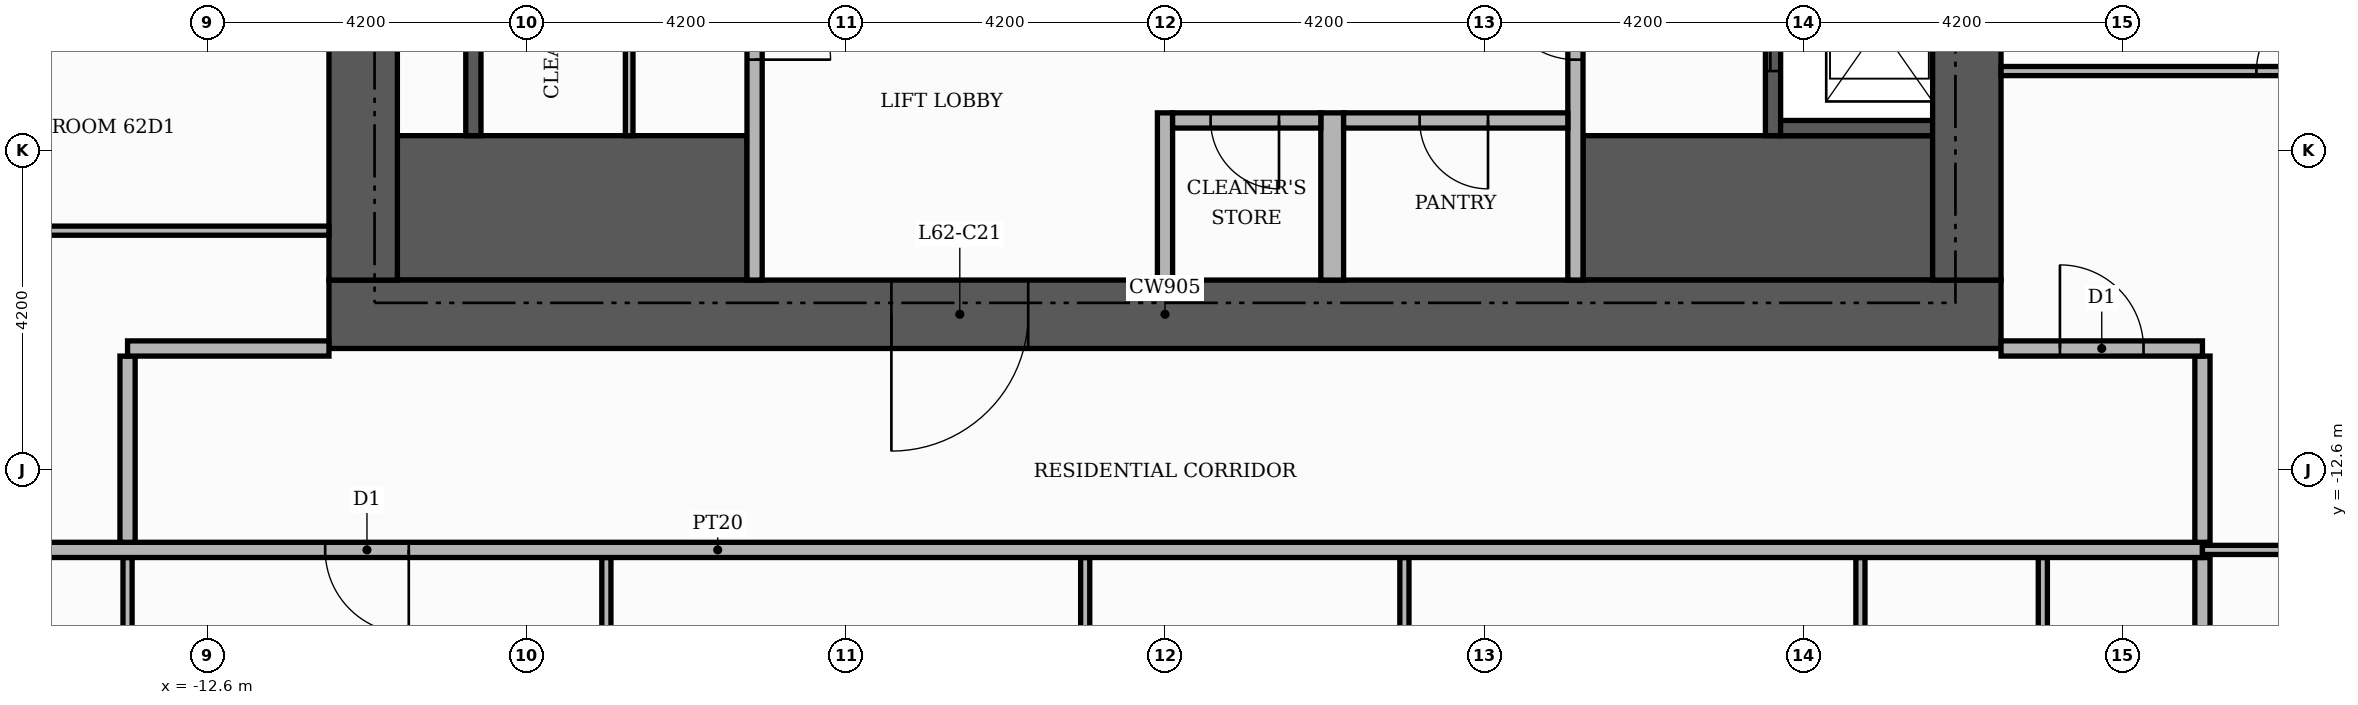
"""IFC4 building model, lengths in metres.
Left out: names, types, materials, properties, quantities, classifications, styles, units other than length and angle.
Written with IfcOpenShell. Run it as: python <this file> out.ifc"""

import sys

from ifc_helpers import new_model, si_unit, direction, frame, frame_2d, origin, place, context, subcontext, project, spatial, rectangle, extrude, element, fill, save


model = new_model("IFC4")
c1 = context("Model", 3, precision=1e-05, world=origin(), true_north=direction((0.0, 1.0)))
c2 = subcontext(c1, "Body", "Model", "MODEL_VIEW")
j1 = project(units=[si_unit("LENGTHUNIT", "METRE"), si_unit("PLANEANGLEUNIT", "RADIAN")], contexts=[c1])
p1 = place(None, origin())
s1 = spatial("IfcSite", under=j1, at=p1, CompositionType="ELEMENT")
p2 = place(p1, origin())
s2 = spatial("IfcBuilding", under=s1, at=p2, CompositionType="ELEMENT")
p3 = place(p2, frame((0.0, 0.0, 260.1)))
s3 = spatial("IfcBuildingStorey", under=s2, at=p3, CompositionType="ELEMENT", Elevation=260.1)
for number, where, z_axis, x_axis in (
    (1, (-10.1, -9.15, 0.0), (0.0, 0.0, 1.0), (1.0, 0.0, 0.0)),
    (2, (5.5, -9.15, 0.0), (0.0, 0.0, 1.0), (1.0, 0.0, 0.0)),
):
    element("IfcWall", number, at=place(p3, frame(where, z_axis=z_axis, x_axis=x_axis)), inside=s3, PredefinedType="SHEAR", context=c2, shape_type="SweptSolid", body=[
        extrude(rectangle(XDim=4.6, YDim=1.9, at=frame_2d((2.3, 0.0))), origin(), (0.0, 0.0, 1.0), 3.48),
    ])
p4 = place(p3, frame((-9.1, -8.2, 0.0), z_axis=(0.0, 0.0, 1.0), x_axis=(0.0, 1.0, 0.0)))
e3 = element("IfcWall", 3, at=p4, inside=s3, PredefinedType="SHEAR", context=c2, shape_type="SweptSolid", body=[
    extrude(rectangle(XDim=16.4, YDim=0.2, at=frame_2d((8.2, 0.0))), origin(), (0.0, 0.0, 1.0), 3.48),
])
p5 = place(p3, frame((8.0, -8.2, 0.0), z_axis=(0.0, 0.0, 1.0), x_axis=(0.0, 1.0, 0.0)))
e4 = element("IfcWall", 4, at=p5, inside=s3, PredefinedType="SHEAR", context=c2, shape_type="SweptSolid", body=[
    extrude(rectangle(XDim=16.4, YDim=0.2, at=frame_2d((8.2, 0.0))), origin(), (0.0, 0.0, 1.0), 3.48),
])
p6 = place(p5, frame((0.85, 0.0, 0.0)))
e5 = element("IfcOpeningElement", 5, at=p6, cuts=e4, PredefinedType="OPENING", context=c2, shape_type="SweptSolid", body=[
    extrude(rectangle(XDim=1.2, YDim=2.1, at=frame_2d((0.6, 1.05))), frame((0.0, 0.11, 0.0), z_axis=(0.0, -1.0, 0.0), x_axis=(1.0, 0.0, 0.0)), (0.0, 0.0, 1.0), 0.22),
])
p7 = place(p5, frame((3.55, 0.0, 0.0)))
e6 = element("IfcOpeningElement", 6, at=p7, cuts=e4, PredefinedType="OPENING", context=c2, shape_type="SweptSolid", body=[
    extrude(rectangle(XDim=1.2, YDim=2.1, at=frame_2d((0.6, 1.05))), frame((0.0, 0.11, 0.0), z_axis=(0.0, -1.0, 0.0), x_axis=(1.0, 0.0, 0.0)), (0.0, 0.0, 1.0), 0.22),
])
p8 = place(p5, frame((6.25, 0.0, 0.0)))
e7 = element("IfcOpeningElement", 7, at=p8, cuts=e4, PredefinedType="OPENING", context=c2, shape_type="SweptSolid", body=[
    extrude(rectangle(XDim=1.2, YDim=2.1, at=frame_2d((0.6, 1.05))), frame((0.0, 0.11, 0.0), z_axis=(0.0, -1.0, 0.0), x_axis=(1.0, 0.0, 0.0)), (0.0, 0.0, 1.0), 0.22),
])
p9 = place(p5, frame((8.95, 0.0, 0.0)))
e8 = element("IfcOpeningElement", 8, at=p9, cuts=e4, PredefinedType="OPENING", context=c2, shape_type="SweptSolid", body=[
    extrude(rectangle(XDim=1.2, YDim=2.1, at=frame_2d((0.6, 1.05))), frame((0.0, 0.11, 0.0), z_axis=(0.0, -1.0, 0.0), x_axis=(1.0, 0.0, 0.0)), (0.0, 0.0, 1.0), 0.22),
])
p10 = place(p5, frame((11.65, 0.0, 0.0)))
e9 = element("IfcOpeningElement", 9, at=p10, cuts=e4, PredefinedType="OPENING", context=c2, shape_type="SweptSolid", body=[
    extrude(rectangle(XDim=1.2, YDim=2.1, at=frame_2d((0.6, 1.05))), frame((0.0, 0.11, 0.0), z_axis=(0.0, -1.0, 0.0), x_axis=(1.0, 0.0, 0.0)), (0.0, 0.0, 1.0), 0.22),
])
p11 = place(p5, frame((14.35, 0.0, 0.0)))
e10 = element("IfcOpeningElement", 10, at=p11, cuts=e4, PredefinedType="OPENING", context=c2, shape_type="SweptSolid", body=[
    extrude(rectangle(XDim=1.2, YDim=2.1, at=frame_2d((0.6, 1.05))), frame((0.0, 0.11, 0.0), z_axis=(0.0, -1.0, 0.0), x_axis=(1.0, 0.0, 0.0)), (0.0, 0.0, 1.0), 0.22),
])
p12 = place(p3, frame((8.1, -8.1, 0.0), z_axis=(0.0, 0.0, 1.0), x_axis=(1.0, 0.0, 0.0)))
e11 = element("IfcWall", 11, at=p12, inside=s3, PredefinedType="SHEAR", context=c2, shape_type="SweptSolid", body=[
    extrude(rectangle(XDim=2.0, YDim=0.2, at=frame_2d((1.0, 0.0))), origin(), (0.0, 0.0, 1.0), 3.48),
])
p13 = place(p3, frame((-11.0, -10.55, 0.0), z_axis=(0.0, 0.0, 1.0), x_axis=(1.0, 0.0, 0.0)))
e12 = element("IfcWall", 12, at=p13, inside=s3, PredefinedType="SHEAR", context=c2, shape_type="SweptSolid", body=[
    extrude(rectangle(XDim=22.0, YDim=0.9, at=frame_2d((11.0, 0.0))), origin(), (0.0, 0.0, 1.0), 3.48),
])
p14 = place(p13, frame((7.4, 0.0, 0.0)))
e13 = element("IfcOpeningElement", 13, at=p14, cuts=e12, PredefinedType="OPENING", context=c2, shape_type="SweptSolid", body=[
    extrude(rectangle(XDim=1.8, YDim=2.2, at=frame_2d((0.9, 1.1))), frame((0.0, 0.46, 0.0), z_axis=(0.0, -1.0, 0.0), x_axis=(1.0, 0.0, 0.0)), (0.0, 0.0, 1.0), 0.92),
])
for number, where, z_axis, x_axis in (
    (14, (-10.55, -10.1, 0.0), (0.0, 0.0, 1.0), (0.0, 1.0, 0.0)),
    (15, (10.55, -10.1, 0.0), (0.0, 0.0, 1.0), (0.0, 1.0, 0.0)),
):
    element("IfcWall", number, at=place(p3, frame(where, z_axis=z_axis, x_axis=x_axis)), inside=s3, PredefinedType="SHEAR", context=c2, shape_type="SweptSolid", body=[
        extrude(rectangle(XDim=20.2, YDim=0.9, at=frame_2d((10.1, 0.0))), origin(), (0.0, 0.0, 1.0), 3.48),
    ])
p15 = place(p3, frame((-5.4, -10.1, 0.0), z_axis=(0.0, 0.0, 1.0), x_axis=(0.0, 1.0, 0.0)))
e16 = element("IfcWall", 16, at=p15, inside=s3, PredefinedType="PARTITIONING", context=c2, shape_type="SweptSolid", body=[
    extrude(rectangle(XDim=4.6, YDim=0.2, at=frame_2d((2.3, 0.0))), origin(), (0.0, 0.0, 1.0), 3.48),
])
p16 = place(p15, frame((2.9, 0.0, 0.0)))
e17 = element("IfcOpeningElement", 17, at=p16, cuts=e16, PredefinedType="OPENING", context=c2, shape_type="SweptSolid", body=[
    extrude(rectangle(XDim=1.0, YDim=2.1, at=frame_2d((0.5, 1.05))), frame((0.0, 0.11, 0.0), z_axis=(0.0, -1.0, 0.0), x_axis=(1.0, 0.0, 0.0)), (0.0, 0.0, 1.0), 0.22),
])
p17 = place(p3, frame((0.0, -10.1, 0.0), z_axis=(0.0, 0.0, 1.0), x_axis=(0.0, 1.0, 0.0)))
e18 = element("IfcWall", 18, at=p17, inside=s3, PredefinedType="PARTITIONING", context=c2, shape_type="SweptSolid", body=[
    extrude(rectangle(XDim=2.2, YDim=0.2, at=frame_2d((1.1, 0.0))), origin(), (0.0, 0.0, 1.0), 3.48),
])
p18 = place(p3, frame((2.2, -10.1, 0.0), z_axis=(0.0, 0.0, 1.0), x_axis=(0.0, 1.0, 0.0)))
e19 = element("IfcWall", 19, at=p18, inside=s3, PredefinedType="PARTITIONING", context=c2, shape_type="SweptSolid", body=[
    extrude(rectangle(XDim=2.2, YDim=0.3, at=frame_2d((1.1, 0.0))), origin(), (0.0, 0.0, 1.0), 3.48),
])
p19 = place(p3, frame((5.4, -10.1, 0.0), z_axis=(0.0, 0.0, 1.0), x_axis=(0.0, 1.0, 0.0)))
e20 = element("IfcWall", 20, at=p19, inside=s3, PredefinedType="PARTITIONING", context=c2, shape_type="SweptSolid", body=[
    extrude(rectangle(XDim=4.6, YDim=0.2, at=frame_2d((2.3, 0.0))), origin(), (0.0, 0.0, 1.0), 3.48),
])
p20 = place(p19, frame((2.9, 0.0, 0.0)))
e21 = element("IfcOpeningElement", 21, at=p20, cuts=e20, PredefinedType="OPENING", context=c2, shape_type="SweptSolid", body=[
    extrude(rectangle(XDim=1.0, YDim=2.1, at=frame_2d((0.5, 1.05))), frame((0.0, 0.11, 0.0), z_axis=(0.0, -1.0, 0.0), x_axis=(1.0, 0.0, 0.0)), (0.0, 0.0, 1.0), 0.22),
])
p21 = place(p3, frame((-7.05, -8.2, 0.0), z_axis=(0.0, 0.0, 1.0), x_axis=(0.0, 1.0, 0.0)))
e22 = element("IfcWall", 22, at=p21, inside=s3, PredefinedType="PARTITIONING", context=c2, shape_type="SweptSolid", body=[
    extrude(rectangle(XDim=16.4, YDim=0.1, at=frame_2d((8.2, 0.0))), origin(), (0.0, 0.0, 1.0), 3.48),
])
p22 = place(p21, frame((1.35, 0.0, 0.0)))
e23 = element("IfcOpeningElement", 23, at=p22, cuts=e22, PredefinedType="OPENING", context=c2, shape_type="SweptSolid", body=[
    extrude(rectangle(XDim=0.9, YDim=2.1, at=frame_2d((0.45, 1.05))), frame((0.0, 0.06, 0.0), z_axis=(0.0, -1.0, 0.0), x_axis=(1.0, 0.0, 0.0)), (0.0, 0.0, 1.0), 0.12),
])
p23 = place(p21, frame((5.05, 0.0, 0.0)))
e24 = element("IfcOpeningElement", 24, at=p23, cuts=e22, PredefinedType="OPENING", context=c2, shape_type="SweptSolid", body=[
    extrude(rectangle(XDim=0.9, YDim=2.1, at=frame_2d((0.45, 1.05))), frame((0.0, 0.06, 0.0), z_axis=(0.0, -1.0, 0.0), x_axis=(1.0, 0.0, 0.0)), (0.0, 0.0, 1.0), 0.12),
])
p24 = place(p21, frame((8.95, 0.0, 0.0)))
e25 = element("IfcOpeningElement", 25, at=p24, cuts=e22, PredefinedType="OPENING", context=c2, shape_type="SweptSolid", body=[
    extrude(rectangle(XDim=0.9, YDim=2.1, at=frame_2d((0.45, 1.05))), frame((0.0, 0.06, 0.0), z_axis=(0.0, -1.0, 0.0), x_axis=(1.0, 0.0, 0.0)), (0.0, 0.0, 1.0), 0.12),
])
p25 = place(p21, frame((13.45, 0.0, 0.0)))
e26 = element("IfcOpeningElement", 26, at=p25, cuts=e22, PredefinedType="OPENING", context=c2, shape_type="SweptSolid", body=[
    extrude(rectangle(XDim=0.9, YDim=2.1, at=frame_2d((0.45, 1.05))), frame((0.0, 0.06, 0.0), z_axis=(0.0, -1.0, 0.0), x_axis=(1.0, 0.0, 0.0)), (0.0, 0.0, 1.0), 0.12),
])
p26 = place(p3, frame((0.1, -8.0, 0.0), z_axis=(0.0, 0.0, 1.0), x_axis=(1.0, 0.0, 0.0)))
e27 = element("IfcWall", 27, at=p26, inside=s3, PredefinedType="PARTITIONING", context=c2, shape_type="SweptSolid", body=[
    extrude(rectangle(XDim=1.95, YDim=0.2, at=frame_2d((0.975, 0.0))), origin(), (0.0, 0.0, 1.0), 3.48),
])
p27 = place(p26, frame((0.5, 0.0, 0.0)))
e28 = element("IfcOpeningElement", 28, at=p27, cuts=e27, PredefinedType="OPENING", context=c2, shape_type="SweptSolid", body=[
    extrude(rectangle(XDim=0.9, YDim=2.1, at=frame_2d((0.45, 1.05))), frame((0.0, 0.11, 0.0), z_axis=(0.0, -1.0, 0.0), x_axis=(1.0, 0.0, 0.0)), (0.0, 0.0, 1.0), 0.22),
])
p28 = place(p3, frame((2.35, -8.0, 0.0), z_axis=(0.0, 0.0, 1.0), x_axis=(1.0, 0.0, 0.0)))
e29 = element("IfcWall", 29, at=p28, inside=s3, PredefinedType="PARTITIONING", context=c2, shape_type="SweptSolid", body=[
    extrude(rectangle(XDim=2.95, YDim=0.2, at=frame_2d((1.475, 0.0))), origin(), (0.0, 0.0, 1.0), 3.48),
])
p29 = place(p28, frame((1.0, 0.0, 0.0)))
e30 = element("IfcOpeningElement", 30, at=p29, cuts=e29, PredefinedType="OPENING", context=c2, shape_type="SweptSolid", body=[
    extrude(rectangle(XDim=0.9, YDim=2.1, at=frame_2d((0.45, 1.05))), frame((0.0, 0.11, 0.0), z_axis=(0.0, -1.0, 0.0), x_axis=(1.0, 0.0, 0.0)), (0.0, 0.0, 1.0), 0.22),
])
p30 = place(p3, frame((13.65, -25.42, 0.0), z_axis=(0.0, 0.0, 1.0), x_axis=(0.0, 1.0, 0.0)))
e31 = element("IfcWall", 31, at=p30, inside=s3, PredefinedType="PARTITIONING", context=c2, shape_type="SweptSolid", body=[
    extrude(rectangle(XDim=11.67, YDim=0.2, at=frame_2d((5.835, 0.0))), origin(), (0.0, 0.0, 1.0), 3.48),
])
p31 = place(p3, frame((-13.65, -20.66, 0.0), z_axis=(0.0, 0.0, 1.0), x_axis=(0.0, 1.0, 0.0)))
e32 = element("IfcWall", 32, at=p31, inside=s3, PredefinedType="PARTITIONING", context=c2, shape_type="SweptSolid", body=[
    extrude(rectangle(XDim=6.91, YDim=0.12, at=frame_2d((3.455, 0.0))), origin(), (0.0, 0.0, 1.0), 3.48),
])
p32 = place(p31, frame((3.025, 0.0, 0.0)))
e33 = element("IfcOpeningElement", 33, at=p32, cuts=e32, PredefinedType="OPENING", context=c2, shape_type="SweptSolid", body=[
    extrude(rectangle(XDim=0.9, YDim=2.1, at=frame_2d((0.45, 1.05))), frame((0.0, 0.07, 0.0), z_axis=(0.0, -1.0, 0.0), x_axis=(1.0, 0.0, 0.0)), (0.0, 0.0, 1.0), 0.14),
])
for number, where, z_axis, x_axis in (
    (34, (-7.35, -19.16, 0.0), (0.0, 0.0, 1.0), (0.0, 1.0, 0.0)),
    (35, (-1.05, -19.16, 0.0), (0.0, 0.0, 1.0), (0.0, 1.0, 0.0)),
    (36, (3.15, -19.16, 0.0), (0.0, 0.0, 1.0), (0.0, 1.0, 0.0)),
    (37, (9.15, -19.16, 0.0), (0.0, 0.0, 1.0), (0.0, 1.0, 0.0)),
    (38, (11.55, -19.16, 0.0), (0.0, 0.0, 1.0), (0.0, 1.0, 0.0)),
):
    element("IfcWall", number, at=place(p3, frame(where, z_axis=z_axis, x_axis=x_axis)), inside=s3, PredefinedType="PARTITIONING", context=c2, shape_type="SweptSolid", body=[
        extrude(rectangle(XDim=5.41, YDim=0.12, at=frame_2d((2.705, 0.0))), origin(), (0.0, 0.0, 1.0), 3.48),
    ])
p33 = place(p3, frame((-25.42, -13.65, 0.0), z_axis=(0.0, 0.0, 1.0), x_axis=(1.0, 0.0, 0.0)))
e39 = element("IfcWall", 39, at=p33, inside=s3, PredefinedType="PARTITIONING", context=c2, shape_type="SweptSolid", body=[
    extrude(rectangle(XDim=39.07, YDim=0.2, at=frame_2d((19.535, 0.0))), origin(), (0.0, 0.0, 1.0), 3.48),
])
p34 = place(p33, frame((14.37, 0.0, 0.0)))
e40 = element("IfcOpeningElement", 40, at=p34, cuts=e39, PredefinedType="OPENING", context=c2, shape_type="SweptSolid", body=[
    extrude(rectangle(XDim=1.1, YDim=2.4, at=frame_2d((0.55, 1.2))), frame((0.0, 0.11, 0.0), z_axis=(0.0, -1.0, 0.0), x_axis=(1.0, 0.0, 0.0)), (0.0, 0.0, 1.0), 0.22),
])
p35 = place(p3, frame((13.65, -13.65, 0.0), z_axis=(0.0, 0.0, 1.0), x_axis=(1.0, 0.0, 0.0)))
e41 = element("IfcWall", 41, at=p35, inside=s3, PredefinedType="PARTITIONING", context=c2, shape_type="SweptSolid", body=[
    extrude(rectangle(XDim=6.47, YDim=0.12, at=frame_2d((3.235, 0.0))), origin(), (0.0, 0.0, 1.0), 3.48),
])
p36 = place(p35, frame((2.785, 0.0, 0.0)))
e42 = element("IfcOpeningElement", 42, at=p36, cuts=e41, PredefinedType="OPENING", context=c2, shape_type="SweptSolid", body=[
    extrude(rectangle(XDim=0.9, YDim=2.1, at=frame_2d((0.45, 1.05))), frame((0.0, 0.07, 0.0), z_axis=(0.0, -1.0, 0.0), x_axis=(1.0, 0.0, 0.0)), (0.0, 0.0, 1.0), 0.14),
])
for number, where, z_axis, x_axis in (
    (43, (-13.65, -13.55, 0.0), (0.0, 0.0, 1.0), (0.0, 1.0, 0.0)),
    (44, (13.65, -13.55, 0.0), (0.0, 0.0, 1.0), (0.0, 1.0, 0.0)),
):
    element("IfcWall", number, at=place(p3, frame(where, z_axis=z_axis, x_axis=x_axis)), inside=s3, PredefinedType="PARTITIONING", context=c2, shape_type="SweptSolid", body=[
        extrude(rectangle(XDim=2.45, YDim=0.2, at=frame_2d((1.225, 0.0))), origin(), (0.0, 0.0, 1.0), 3.48),
    ])
p37 = place(p3, frame((-13.65, -11.0, 0.0), z_axis=(0.0, 0.0, 1.0), x_axis=(1.0, 0.0, 0.0)))
e45 = element("IfcWall", 45, at=p37, inside=s3, PredefinedType="PARTITIONING", context=c2, shape_type="SweptSolid", body=[
    extrude(rectangle(XDim=2.65, YDim=0.2, at=frame_2d((1.325, 0.0))), origin(), (0.0, 0.0, 1.0), 3.48),
])
p38 = place(p3, frame((11.0, -11.0, 0.0), z_axis=(0.0, 0.0, 1.0), x_axis=(1.0, 0.0, 0.0)))
e46 = element("IfcWall", 46, at=p38, inside=s3, PredefinedType="PARTITIONING", context=c2, shape_type="SweptSolid", body=[
    extrude(rectangle(XDim=2.65, YDim=0.2, at=frame_2d((1.325, 0.0))), origin(), (0.0, 0.0, 1.0), 3.48),
])
p39 = place(p38, frame((0.775, 0.0, 0.0)))
e47 = element("IfcOpeningElement", 47, at=p39, cuts=e46, PredefinedType="OPENING", context=c2, shape_type="SweptSolid", body=[
    extrude(rectangle(XDim=1.1, YDim=2.4, at=frame_2d((0.55, 1.2))), frame((0.0, 0.11, 0.0), z_axis=(0.0, -1.0, 0.0), x_axis=(1.0, 0.0, 0.0)), (0.0, 0.0, 1.0), 0.22),
])
p40 = place(p3, frame((-19.22, -9.45, 0.0), z_axis=(0.0, 0.0, 1.0), x_axis=(1.0, 0.0, 0.0)))
e48 = element("IfcWall", 48, at=p40, inside=s3, PredefinedType="PARTITIONING", context=c2, shape_type="SweptSolid", body=[
    extrude(rectangle(XDim=8.22, YDim=0.12, at=frame_2d((4.11, 0.0))), origin(), (0.0, 0.0, 1.0), 3.48),
])
p41 = place(p3, frame((11.0, -7.35, 0.0), z_axis=(0.0, 0.0, 1.0), x_axis=(1.0, 0.0, 0.0)))
e49 = element("IfcWall", 49, at=p41, inside=s3, PredefinedType="PARTITIONING", context=c2, shape_type="SweptSolid", body=[
    extrude(rectangle(XDim=7.62, YDim=0.12, at=frame_2d((3.81, 0.0))), origin(), (0.0, 0.0, 1.0), 3.48),
])
p42 = place(p41, frame((3.36, 0.0, 0.0)))
e50 = element("IfcOpeningElement", 50, at=p42, cuts=e49, PredefinedType="OPENING", context=c2, shape_type="SweptSolid", body=[
    extrude(rectangle(XDim=0.9, YDim=2.1, at=frame_2d((0.45, 1.05))), frame((0.0, 0.07, 0.0), z_axis=(0.0, -1.0, 0.0), x_axis=(1.0, 0.0, 0.0)), (0.0, 0.0, 1.0), 0.14),
])
p43 = place(p6, origin())
e51 = element("IfcDoor", 51, at=p43, inside=s3, OperationType="SLIDING_TO_LEFT", PredefinedType="DOOR", context=c2, shape_type="SweptSolid", body=[
    extrude(rectangle(XDim=1.2, YDim=2.1, at=frame_2d((0.6, 1.05))), frame((0.0, 0.025, 0.0), z_axis=(0.0, -1.0, 0.0), x_axis=(1.0, 0.0, 0.0)), (0.0, 0.0, 1.0), 0.05),
])
fill(e5, e51)
p44 = place(p16, frame((1.0, 0.0, 0.0), z_axis=(0.0, 0.0, 1.0), x_axis=(-1.0, 0.0, 0.0)))
e52 = element("IfcDoor", 52, at=p44, inside=s3, OperationType="SINGLE_SWING_LEFT", PredefinedType="DOOR", context=c2, shape_type="SweptSolid", body=[
    extrude(rectangle(XDim=1.0, YDim=2.1, at=frame_2d((0.5, 1.05))), frame((0.0, 0.025, 0.0), z_axis=(0.0, -1.0, 0.0), x_axis=(1.0, 0.0, 0.0)), (0.0, 0.0, 1.0), 0.05),
])
fill(e17, e52)
p45 = place(p20, origin())
e53 = element("IfcDoor", 53, at=p45, inside=s3, OperationType="SINGLE_SWING_RIGHT", PredefinedType="DOOR", context=c2, shape_type="SweptSolid", body=[
    extrude(rectangle(XDim=1.0, YDim=2.1, at=frame_2d((0.5, 1.05))), frame((0.0, 0.025, 0.0), z_axis=(0.0, -1.0, 0.0), x_axis=(1.0, 0.0, 0.0)), (0.0, 0.0, 1.0), 0.05),
])
fill(e21, e53)
p46 = place(p14, frame((1.8, 0.0, 0.0), z_axis=(0.0, 0.0, 1.0), x_axis=(-1.0, 0.0, 0.0)))
e54 = element("IfcDoor", 54, at=p46, inside=s3, OperationType="DOUBLE_DOOR_SINGLE_SWING", PredefinedType="DOOR", context=c2, shape_type="SweptSolid", body=[
    extrude(rectangle(XDim=1.8, YDim=2.2, at=frame_2d((0.9, 1.1))), frame((0.0, 0.025, 0.0), z_axis=(0.0, -1.0, 0.0), x_axis=(1.0, 0.0, 0.0)), (0.0, 0.0, 1.0), 0.05),
])
fill(e13, e54)
p47 = place(p27, frame((0.9, 0.0, 0.0), z_axis=(0.0, 0.0, 1.0), x_axis=(-1.0, 0.0, 0.0)))
e55 = element("IfcDoor", 55, at=p47, inside=s3, OperationType="SINGLE_SWING_RIGHT", PredefinedType="DOOR", context=c2, shape_type="SweptSolid", body=[
    extrude(rectangle(XDim=0.9, YDim=2.1, at=frame_2d((0.45, 1.05))), frame((0.0, 0.025, 0.0), z_axis=(0.0, -1.0, 0.0), x_axis=(1.0, 0.0, 0.0)), (0.0, 0.0, 1.0), 0.05),
])
fill(e28, e55)
p48 = place(p29, frame((0.9, 0.0, 0.0), z_axis=(0.0, 0.0, 1.0), x_axis=(-1.0, 0.0, 0.0)))
e56 = element("IfcDoor", 56, at=p48, inside=s3, OperationType="SINGLE_SWING_RIGHT", PredefinedType="DOOR", context=c2, shape_type="SweptSolid", body=[
    extrude(rectangle(XDim=0.9, YDim=2.1, at=frame_2d((0.45, 1.05))), frame((0.0, 0.025, 0.0), z_axis=(0.0, -1.0, 0.0), x_axis=(1.0, 0.0, 0.0)), (0.0, 0.0, 1.0), 0.05),
])
fill(e30, e56)
p49 = place(p34, frame((1.1, 0.0, 0.0), z_axis=(0.0, 0.0, 1.0), x_axis=(-1.0, 0.0, 0.0)))
e57 = element("IfcDoor", 57, at=p49, inside=s3, OperationType="SINGLE_SWING_RIGHT", PredefinedType="DOOR", context=c2, shape_type="SweptSolid", body=[
    extrude(rectangle(XDim=1.1, YDim=2.4, at=frame_2d((0.55, 1.2))), frame((0.0, 0.025, 0.0), z_axis=(0.0, -1.0, 0.0), x_axis=(1.0, 0.0, 0.0)), (0.0, 0.0, 1.0), 0.05),
])
fill(e40, e57)
p50 = place(p39, origin())
e58 = element("IfcDoor", 58, at=p50, inside=s3, OperationType="SINGLE_SWING_LEFT", PredefinedType="DOOR", context=c2, shape_type="SweptSolid", body=[
    extrude(rectangle(XDim=1.1, YDim=2.4, at=frame_2d((0.55, 1.2))), frame((0.0, 0.025, 0.0), z_axis=(0.0, -1.0, 0.0), x_axis=(1.0, 0.0, 0.0)), (0.0, 0.0, 1.0), 0.05),
])
fill(e47, e58)
p51 = place(p42, origin())
e59 = element("IfcDoor", 59, at=p51, inside=s3, OperationType="SINGLE_SWING_RIGHT", PredefinedType="DOOR", context=c2, shape_type="SweptSolid", body=[
    extrude(rectangle(XDim=0.9, YDim=2.1, at=frame_2d((0.45, 1.05))), frame((0.0, 0.025, 0.0), z_axis=(0.0, -1.0, 0.0), x_axis=(1.0, 0.0, 0.0)), (0.0, 0.0, 1.0), 0.05),
])
fill(e50, e59)
save(model, sys.argv[1])
